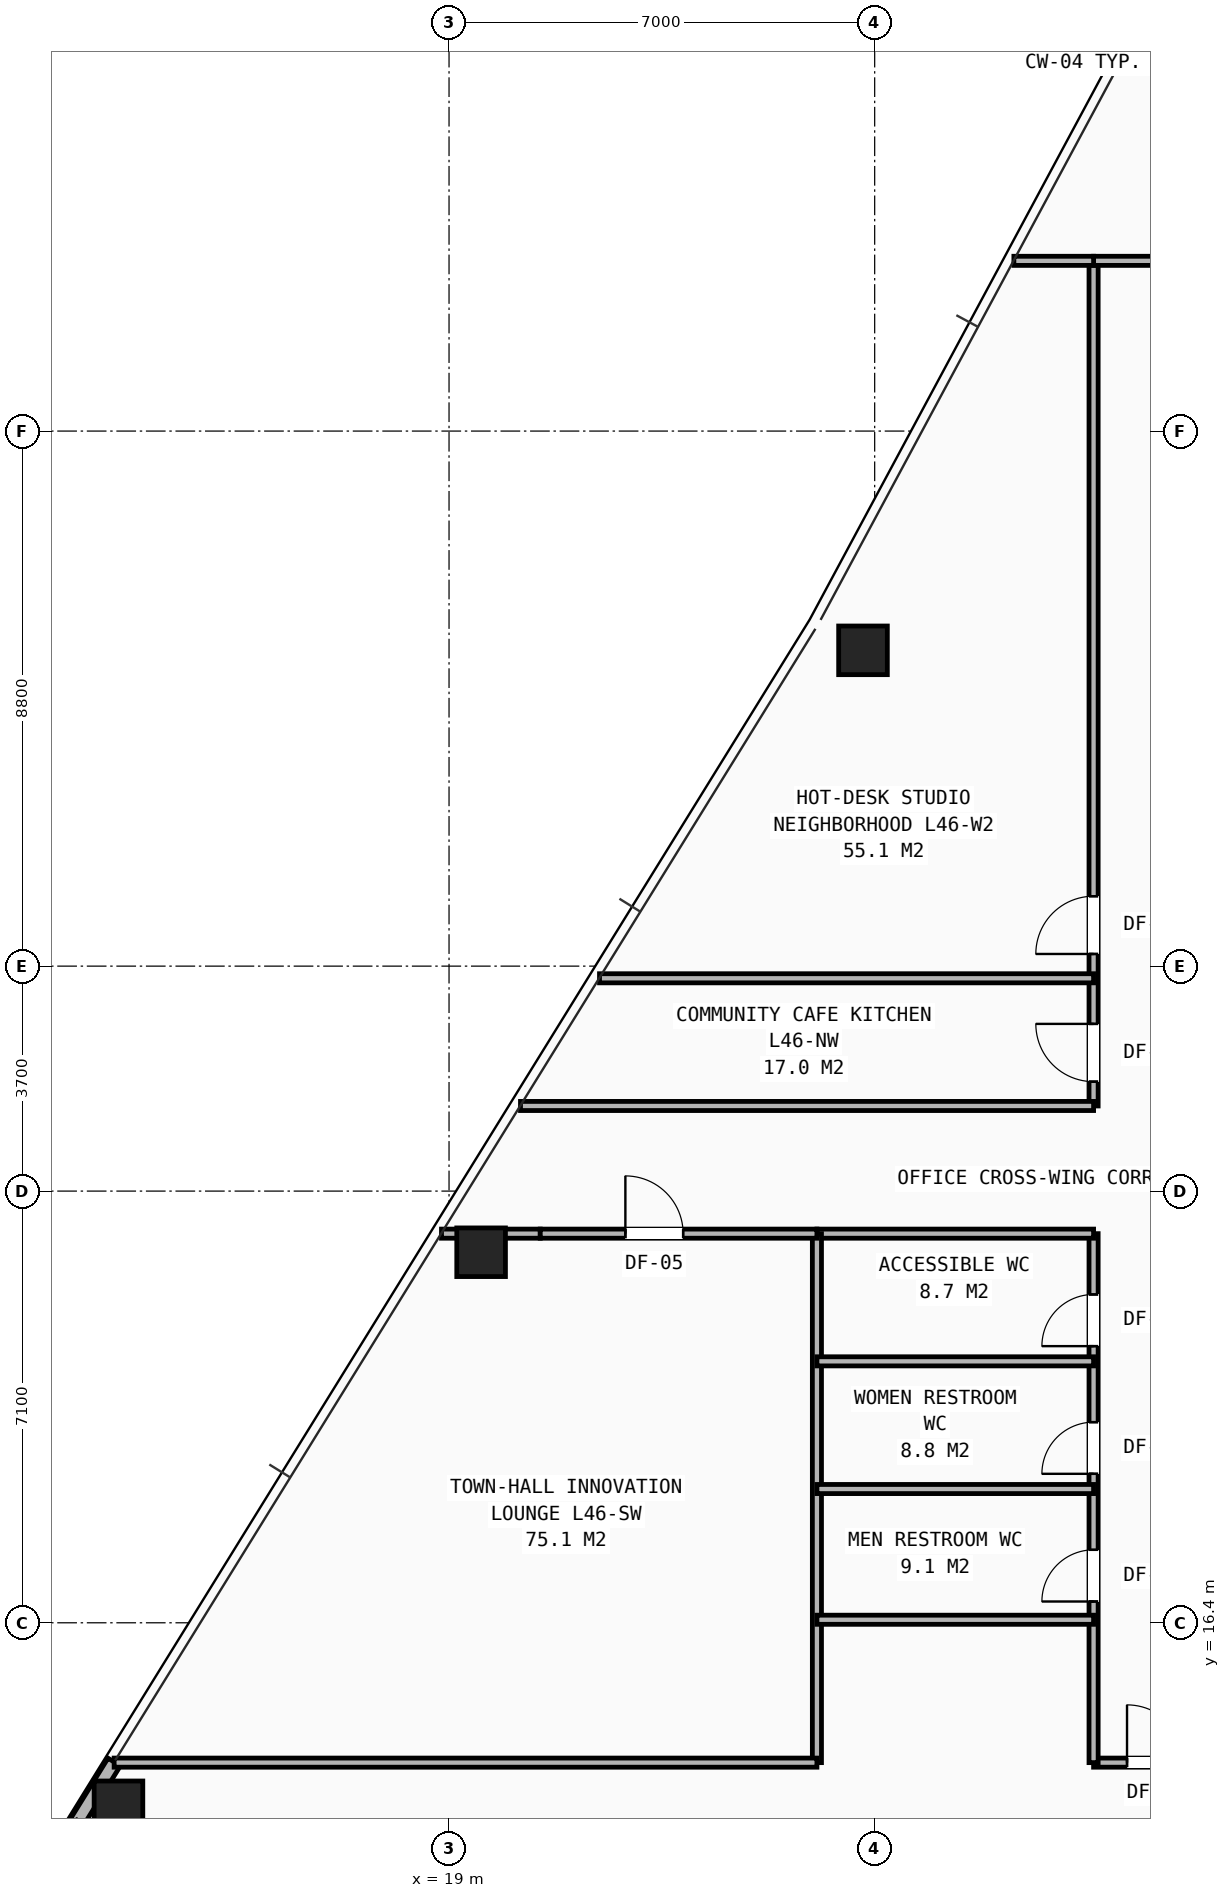
"""IFC4 building model, lengths in metres.
Left out: names, types, materials, properties, quantities, classifications, styles, units other than length and angle.
Written with IfcOpenShell. Run it as: python <this file> out.ifc"""

import sys

from ifc_helpers import new_model, si_unit, direction, frame, frame_2d, origin, origin_2d, place, context, subcontext, project, spatial, rectangle, hollow_rectangle, extrude, element, fill, save


model = new_model("IFC4")
c1 = context("Model", 3, precision=1e-05, world=origin(), true_north=direction((0.0, 1.0)))
c2 = subcontext(c1, "Body", "Model", "MODEL_VIEW")
j1 = project(units=[si_unit("LENGTHUNIT", "METRE"), si_unit("PLANEANGLEUNIT", "RADIAN")], contexts=[c1])
p1 = place(None, origin())
s1 = spatial("IfcSite", under=j1, at=p1, CompositionType="ELEMENT")
p2 = place(p1, origin())
s2 = spatial("IfcBuilding", under=s1, at=p2, CompositionType="ELEMENT")
p3 = place(p2, frame((0.0, 0.0, 162.0)))
s3 = spatial("IfcBuildingStorey", under=s2, at=p3, CompositionType="ELEMENT", Elevation=162.0)
for number, where, z_axis, x_axis in (
    (1, (25.808, 32.394, 0.0), (0.0, 0.0, 1.0), (1.0, 0.0, 0.0)),
    (2, (19.527, 22.494, 0.0), (0.0, 0.0, 1.0), (1.0, 0.0, 0.0)),
    (3, (13.564, 13.398, 0.0), (0.0, 0.0, 1.0), (1.0, 0.0, 0.0)),
):
    element("IfcColumn", number, at=place(p3, frame(where, z_axis=z_axis, x_axis=x_axis)), inside=s3, PredefinedType="COLUMN", context=c2, shape_type="SweptSolid", body=[
        extrude(hollow_rectangle(XDim=0.8, YDim=0.8, WallThickness=0.055, at=origin_2d()), origin(), (0.0, 0.0, 1.0), 3.45),
    ])
p4 = place(p3, frame((13.493, 14.111, 0.0), z_axis=(0.0, 0.0, 1.0), x_axis=(-0.526196207656, -0.850363187731, 0.0)))
e4 = element("IfcWall", 4, at=p4, inside=s3, PredefinedType="SHEAR", context=c2, shape_type="SweptSolid", body=[
    extrude(rectangle(XDim=1.167, YDim=0.24, at=frame_2d((0.583, 0.0))), origin(), (0.0, 0.0, 1.0), 2.583),
])
p5 = place(p3, frame((29.6, 14.1, 0.0), z_axis=(0.0, 0.0, 1.0), x_axis=(1.0, 0.0, 0.0)))
e5 = element("IfcWall", 5, at=p5, inside=s3, PredefinedType="PARTITIONING", context=c2, shape_type="SweptSolid", body=[
    extrude(rectangle(XDim=18.6, YDim=0.15, at=frame_2d((9.3, 0.0))), origin(), (0.0, 0.0, 1.0), 2.252),
])
p6 = place(p5, frame((0.55, 0.0, 0.0)))
e6 = element("IfcOpeningElement", 6, at=p6, cuts=e5, PredefinedType="OPENING", context=c2, shape_type="SweptSolid", body=[
    extrude(rectangle(XDim=0.95, YDim=2.1, at=frame_2d((0.475, 1.05))), frame((0.0, 0.085, 0.0), z_axis=(0.0, -1.0, 0.0), x_axis=(1.0, 0.0, 0.0)), (0.0, 0.0, 1.0), 0.17),
])
p7 = place(p5, frame((2.25, 0.0, 0.0)))
e7 = element("IfcOpeningElement", 7, at=p7, cuts=e5, PredefinedType="OPENING", context=c2, shape_type="SweptSolid", body=[
    extrude(rectangle(XDim=0.95, YDim=2.1, at=frame_2d((0.475, 1.05))), frame((0.0, 0.085, 0.0), z_axis=(0.0, -1.0, 0.0), x_axis=(1.0, 0.0, 0.0)), (0.0, 0.0, 1.0), 0.17),
])
p8 = place(p5, frame((6.55, 0.0, 0.0)))
e8 = element("IfcOpeningElement", 8, at=p8, cuts=e5, PredefinedType="OPENING", context=c2, shape_type="SweptSolid", body=[
    extrude(rectangle(XDim=0.95, YDim=2.1, at=frame_2d((0.475, 1.05))), frame((0.0, 0.085, 0.0), z_axis=(0.0, -1.0, 0.0), x_axis=(1.0, 0.0, 0.0)), (0.0, 0.0, 1.0), 0.17),
])
p9 = place(p5, frame((10.75, 0.0, 0.0)))
e9 = element("IfcOpeningElement", 9, at=p9, cuts=e5, PredefinedType="OPENING", context=c2, shape_type="SweptSolid", body=[
    extrude(rectangle(XDim=0.95, YDim=2.1, at=frame_2d((0.475, 1.05))), frame((0.0, 0.085, 0.0), z_axis=(0.0, -1.0, 0.0), x_axis=(1.0, 0.0, 0.0)), (0.0, 0.0, 1.0), 0.17),
])
p10 = place(p5, frame((14.95, 0.0, 0.0)))
e10 = element("IfcOpeningElement", 10, at=p10, cuts=e5, PredefinedType="OPENING", context=c2, shape_type="SweptSolid", body=[
    extrude(rectangle(XDim=0.95, YDim=2.1, at=frame_2d((0.475, 1.05))), frame((0.0, 0.085, 0.0), z_axis=(0.0, -1.0, 0.0), x_axis=(1.0, 0.0, 0.0)), (0.0, 0.0, 1.0), 0.17),
])
p11 = place(p3, frame((29.6, 14.1, 0.0), z_axis=(0.0, 0.0, 1.0), x_axis=(0.0, 1.0, 0.0)))
e11 = element("IfcWall", 11, at=p11, inside=s3, PredefinedType="PARTITIONING", context=c2, shape_type="SweptSolid", body=[
    extrude(rectangle(XDim=8.7, YDim=0.15, at=frame_2d((4.35, 0.0))), origin(), (0.0, 0.0, 1.0), 3.21),
])
p12 = place(p11, frame((2.65, 0.0, 0.0)))
e12 = element("IfcOpeningElement", 12, at=p12, cuts=e11, PredefinedType="OPENING", context=c2, shape_type="SweptSolid", body=[
    extrude(rectangle(XDim=0.85, YDim=2.05, at=frame_2d((0.425, 1.025))), frame((0.0, 0.085, 0.0), z_axis=(0.0, -1.0, 0.0), x_axis=(1.0, 0.0, 0.0)), (0.0, 0.0, 1.0), 0.17),
])
p13 = place(p11, frame((4.75, 0.0, 0.0)))
e13 = element("IfcOpeningElement", 13, at=p13, cuts=e11, PredefinedType="OPENING", context=c2, shape_type="SweptSolid", body=[
    extrude(rectangle(XDim=0.85, YDim=2.05, at=frame_2d((0.425, 1.025))), frame((0.0, 0.085, 0.0), z_axis=(0.0, -1.0, 0.0), x_axis=(1.0, 0.0, 0.0)), (0.0, 0.0, 1.0), 0.17),
])
p14 = place(p11, frame((6.85, 0.0, 0.0)))
e14 = element("IfcOpeningElement", 14, at=p14, cuts=e11, PredefinedType="OPENING", context=c2, shape_type="SweptSolid", body=[
    extrude(rectangle(XDim=0.85, YDim=2.05, at=frame_2d((0.425, 1.025))), frame((0.0, 0.085, 0.0), z_axis=(0.0, -1.0, 0.0), x_axis=(1.0, 0.0, 0.0)), (0.0, 0.0, 1.0), 0.17),
])
p15 = place(p3, frame((29.6, 24.9, 0.0), z_axis=(0.0, 0.0, 1.0), x_axis=(0.0, 1.0, 0.0)))
e15 = element("IfcWall", 15, at=p15, inside=s3, PredefinedType="PARTITIONING", context=c2, shape_type="SweptSolid", body=[
    extrude(rectangle(XDim=13.9, YDim=0.15, at=frame_2d((6.95, 0.0))), origin(), (0.0, 0.0, 1.0), 2.252),
])
p16 = place(p15, frame((0.4, 0.0, 0.0)))
e16 = element("IfcOpeningElement", 16, at=p16, cuts=e15, PredefinedType="OPENING", context=c2, shape_type="SweptSolid", body=[
    extrude(rectangle(XDim=0.95, YDim=2.1, at=frame_2d((0.475, 1.05))), frame((0.0, 0.085, 0.0), z_axis=(0.0, -1.0, 0.0), x_axis=(1.0, 0.0, 0.0)), (0.0, 0.0, 1.0), 0.17),
])
p17 = place(p15, frame((2.5, 0.0, 0.0)))
e17 = element("IfcOpeningElement", 17, at=p17, cuts=e15, PredefinedType="OPENING", context=c2, shape_type="SweptSolid", body=[
    extrude(rectangle(XDim=0.95, YDim=2.1, at=frame_2d((0.475, 1.05))), frame((0.0, 0.085, 0.0), z_axis=(0.0, -1.0, 0.0), x_axis=(1.0, 0.0, 0.0)), (0.0, 0.0, 1.0), 0.17),
])
p18 = place(p3, frame((29.6, 38.8, 0.0), z_axis=(0.0, 0.0, 1.0), x_axis=(1.0, 0.0, 0.0)))
e18 = element("IfcWall", 18, at=p18, inside=s3, PredefinedType="PARTITIONING", context=c2, shape_type="SweptSolid", body=[
    extrude(rectangle(XDim=2.2, YDim=0.15, at=frame_2d((1.1, 0.0))), origin(), (0.0, 0.0, 1.0), 2.589),
])
p19 = place(p3, frame((18.876, 22.8, 0.0), z_axis=(0.0, 0.0, 1.0), x_axis=(1.0, 0.0, 0.0)))
e19 = element("IfcWall", 19, at=p19, inside=s3, PredefinedType="PARTITIONING", context=c2, shape_type="SweptSolid", body=[
    extrude(rectangle(XDim=1.624, YDim=0.15, at=frame_2d((0.812, 0.0))), origin(), (0.0, 0.0, 1.0), 2.589),
])
p20 = place(p3, frame((25.05, 22.8, 0.0), z_axis=(0.0, 0.0, 1.0), x_axis=(1.0, 0.0, 0.0)))
e20 = element("IfcWall", 20, at=p20, inside=s3, PredefinedType="PARTITIONING", context=c2, shape_type="SweptSolid", body=[
    extrude(rectangle(XDim=4.55, YDim=0.15, at=frame_2d((2.275, 0.0))), origin(), (0.0, 0.0, 1.0), 3.21),
])
p21 = place(p3, frame((20.175, 24.9, 0.0), z_axis=(0.0, 0.0, 1.0), x_axis=(1.0, 0.0, 0.0)))
e21 = element("IfcWall", 21, at=p21, inside=s3, PredefinedType="PARTITIONING", context=c2, shape_type="SweptSolid", body=[
    extrude(rectangle(XDim=9.425, YDim=0.15, at=frame_2d((4.712, 0.0))), origin(), (0.0, 0.0, 1.0), 2.589),
])
p22 = place(p3, frame((25.05, 14.1, 0.0), z_axis=(0.0, 0.0, 1.0), x_axis=(0.0, 1.0, 0.0)))
e22 = element("IfcWall", 22, at=p22, inside=s3, PredefinedType="PARTITIONING", context=c2, shape_type="SweptSolid", body=[
    extrude(rectangle(XDim=8.7, YDim=0.15, at=frame_2d((4.35, 0.0))), origin(), (0.0, 0.0, 1.0), 3.21),
])
for number, where, z_axis, x_axis in (
    (23, (25.05, 16.45, 0.0), (0.0, 0.0, 1.0), (1.0, 0.0, 0.0)),
    (24, (25.05, 18.6, 0.0), (0.0, 0.0, 1.0), (1.0, 0.0, 0.0)),
    (25, (25.05, 20.7, 0.0), (0.0, 0.0, 1.0), (1.0, 0.0, 0.0)),
):
    element("IfcWall", number, at=place(p3, frame(where, z_axis=z_axis, x_axis=x_axis)), inside=s3, PredefinedType="PARTITIONING", context=c2, shape_type="SweptSolid", body=[
        extrude(rectangle(XDim=4.55, YDim=0.15, at=frame_2d((2.275, 0.0))), origin(), (0.0, 0.0, 1.0), 3.21),
    ])
p23 = place(p3, frame((13.492, 14.1, 0.0), z_axis=(0.0, 0.0, 1.0), x_axis=(1.0, 0.0, 0.0)))
e26 = element("IfcWall", 26, at=p23, inside=s3, PredefinedType="PARTITIONING", context=c2, shape_type="SweptSolid", body=[
    extrude(rectangle(XDim=11.558, YDim=0.15, at=frame_2d((5.779, 0.0))), origin(), (0.0, 0.0, 1.0), 2.589),
])
p24 = place(p3, frame((20.5, 22.8, 0.0), z_axis=(0.0, 0.0, 1.0), x_axis=(1.0, 0.0, 0.0)))
e27 = element("IfcWall", 27, at=p24, inside=s3, PredefinedType="PARTITIONING", context=c2, shape_type="SweptSolid", body=[
    extrude(rectangle(XDim=4.55, YDim=0.15, at=frame_2d((2.275, 0.0))), origin(), (0.0, 0.0, 1.0), 3.21),
])
p25 = place(p24, frame((1.4, 0.0, 0.0)))
e28 = element("IfcOpeningElement", 28, at=p25, cuts=e27, PredefinedType="OPENING", context=c2, shape_type="SweptSolid", body=[
    extrude(rectangle(XDim=0.95, YDim=2.1, at=frame_2d((0.475, 1.05))), frame((0.0, 0.085, 0.0), z_axis=(0.0, -1.0, 0.0), x_axis=(1.0, 0.0, 0.0)), (0.0, 0.0, 1.0), 0.17),
])
p26 = place(p3, frame((28.289, 38.8, 0.0), z_axis=(0.0, 0.0, 1.0), x_axis=(1.0, 0.0, 0.0)))
e29 = element("IfcWall", 29, at=p26, inside=s3, PredefinedType="PARTITIONING", context=c2, shape_type="SweptSolid", body=[
    extrude(rectangle(XDim=1.311, YDim=0.15, at=frame_2d((0.655, 0.0))), origin(), (0.0, 0.0, 1.0), 2.589),
])
p27 = place(p3, frame((21.475, 27.0, 0.0), z_axis=(0.0, 0.0, 1.0), x_axis=(1.0, 0.0, 0.0)))
e30 = element("IfcWall", 30, at=p27, inside=s3, PredefinedType="PARTITIONING", context=c2, shape_type="SweptSolid", body=[
    extrude(rectangle(XDim=8.125, YDim=0.15, at=frame_2d((4.063, 0.0))), origin(), (0.0, 0.0, 1.0), 2.589),
])
p28 = place(p12, origin())
e31 = element("IfcDoor", 31, at=p28, inside=s3, OperationType="SINGLE_SWING_LEFT", PredefinedType="DOOR", context=c2, shape_type="SweptSolid", body=[
    extrude(rectangle(XDim=0.85, YDim=2.05, at=frame_2d((0.425, 1.025))), frame((0.0, 0.025, 0.0), z_axis=(0.0, -1.0, 0.0), x_axis=(1.0, 0.0, 0.0)), (0.0, 0.0, 1.0), 0.05),
])
fill(e12, e31)
p29 = place(p13, origin())
e32 = element("IfcDoor", 32, at=p29, inside=s3, OperationType="SINGLE_SWING_LEFT", PredefinedType="DOOR", context=c2, shape_type="SweptSolid", body=[
    extrude(rectangle(XDim=0.85, YDim=2.05, at=frame_2d((0.425, 1.025))), frame((0.0, 0.025, 0.0), z_axis=(0.0, -1.0, 0.0), x_axis=(1.0, 0.0, 0.0)), (0.0, 0.0, 1.0), 0.05),
])
fill(e13, e32)
p30 = place(p14, origin())
e33 = element("IfcDoor", 33, at=p30, inside=s3, OperationType="SINGLE_SWING_LEFT", PredefinedType="DOOR", context=c2, shape_type="SweptSolid", body=[
    extrude(rectangle(XDim=0.85, YDim=2.05, at=frame_2d((0.425, 1.025))), frame((0.0, 0.025, 0.0), z_axis=(0.0, -1.0, 0.0), x_axis=(1.0, 0.0, 0.0)), (0.0, 0.0, 1.0), 0.05),
])
fill(e14, e33)
p31 = place(p6, origin())
e34 = element("IfcDoor", 34, at=p31, inside=s3, OperationType="SINGLE_SWING_LEFT", PredefinedType="DOOR", context=c2, shape_type="SweptSolid", body=[
    extrude(rectangle(XDim=0.95, YDim=2.1, at=frame_2d((0.475, 1.05))), frame((0.0, 0.025, 0.0), z_axis=(0.0, -1.0, 0.0), x_axis=(1.0, 0.0, 0.0)), (0.0, 0.0, 1.0), 0.05),
])
fill(e6, e34)
p32 = place(p25, origin())
e35 = element("IfcDoor", 35, at=p32, inside=s3, OperationType="SINGLE_SWING_LEFT", PredefinedType="DOOR", context=c2, shape_type="SweptSolid", body=[
    extrude(rectangle(XDim=0.95, YDim=2.1, at=frame_2d((0.475, 1.05))), frame((0.0, 0.025, 0.0), z_axis=(0.0, -1.0, 0.0), x_axis=(1.0, 0.0, 0.0)), (0.0, 0.0, 1.0), 0.05),
])
fill(e28, e35)
p33 = place(p16, origin())
e36 = element("IfcDoor", 36, at=p33, inside=s3, OperationType="SINGLE_SWING_RIGHT", PredefinedType="DOOR", context=c2, shape_type="SweptSolid", body=[
    extrude(rectangle(XDim=0.95, YDim=2.1, at=frame_2d((0.475, 1.05))), frame((0.0, 0.025, 0.0), z_axis=(0.0, -1.0, 0.0), x_axis=(1.0, 0.0, 0.0)), (0.0, 0.0, 1.0), 0.05),
])
fill(e16, e36)
p34 = place(p17, origin())
e37 = element("IfcDoor", 37, at=p34, inside=s3, OperationType="SINGLE_SWING_LEFT", PredefinedType="DOOR", context=c2, shape_type="SweptSolid", body=[
    extrude(rectangle(XDim=0.95, YDim=2.1, at=frame_2d((0.475, 1.05))), frame((0.0, 0.025, 0.0), z_axis=(0.0, -1.0, 0.0), x_axis=(1.0, 0.0, 0.0)), (0.0, 0.0, 1.0), 0.05),
])
fill(e17, e37)
save(model, sys.argv[1])
